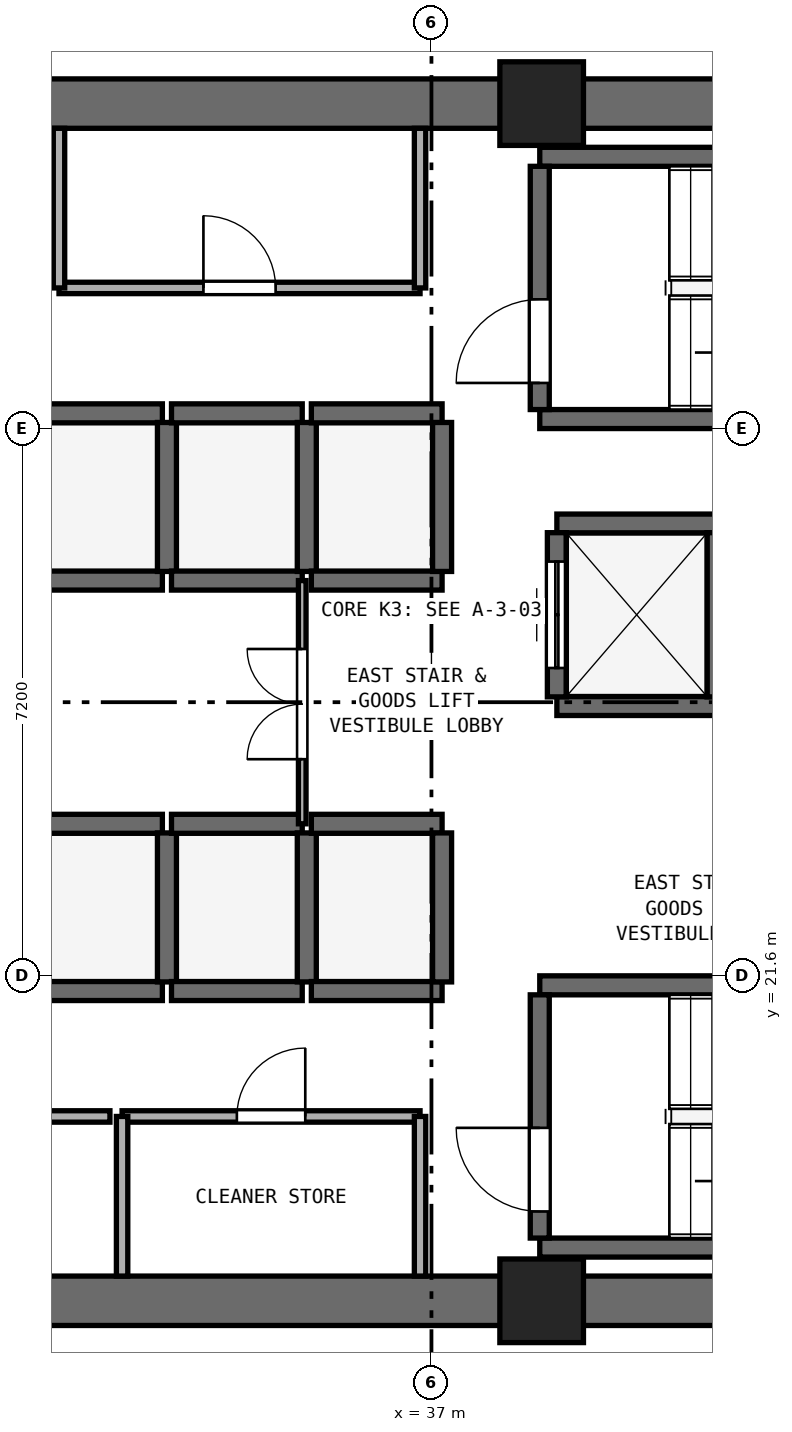
"""IFC4 building model, lengths in metres.
Left out: names, types, materials, properties, quantities, classifications, styles, units other than length and angle.
Written with IfcOpenShell. Run it as: python <this file> out.ifc"""

import sys

from ifc_helpers import new_model, si_unit, direction, frame, frame_2d, origin, origin_2d, place, context, subcontext, project, spatial, rectangle, extrude, element, fill, save


model = new_model("IFC4")
c1 = context("Model", 3, precision=1e-05, world=origin(), true_north=direction((0.0, 1.0)))
c2 = subcontext(c1, "Body", "Model", "MODEL_VIEW")
j1 = project(units=[si_unit("LENGTHUNIT", "METRE"), si_unit("PLANEANGLEUNIT", "RADIAN")], contexts=[c1])
p1 = place(None, origin())
s1 = spatial("IfcSite", under=j1, at=p1, CompositionType="ELEMENT")
p2 = place(p1, origin())
s2 = spatial("IfcBuilding", under=s1, at=p2, CompositionType="ELEMENT")
p3 = place(p2, frame((0.0, 0.0, 32.6)))
s3 = spatial("IfcBuildingStorey", under=s2, at=p3, CompositionType="ELEMENT", Elevation=32.6)
for number, where, z_axis, x_axis in (
    (1, (25.4, 17.325, 0.0), (0.0, 0.0, 1.0), (1.0, 0.0, 0.0)),
    (2, (25.4, 33.075, 0.0), (0.0, 0.0, 1.0), (1.0, 0.0, 0.0)),
):
    element("IfcWall", number, at=place(p3, frame(where, z_axis=z_axis, x_axis=x_axis)), inside=s3, PredefinedType="SHEAR", context=c2, shape_type="SweptSolid", body=[
        extrude(rectangle(XDim=23.2, YDim=0.65, at=frame_2d((11.6, 0.0))), origin(), (0.0, 0.0, 1.0), 3.525),
    ])
for number, where, z_axis, x_axis in (
    (3, (38.45, 17.325, 0.0), (0.0, 0.0, 1.0), (1.0, 0.0, 0.0)),
    (4, (38.45, 33.075, 0.0), (0.0, 0.0, 1.0), (1.0, 0.0, 0.0)),
):
    element("IfcColumn", number, at=place(p3, frame(where, z_axis=z_axis, x_axis=x_axis)), inside=s3, PredefinedType="PILASTER", context=c2, shape_type="SweptSolid", body=[
        extrude(rectangle(XDim=1.1, YDim=1.1, at=origin_2d()), origin(), (0.0, 0.0, 1.0), 3.8),
    ])
for number, where, z_axis, x_axis in (
    (5, (38.425, 28.925, 0.0), (0.0, 0.0, 1.0), (1.0, 0.0, 0.0)),
    (6, (38.425, 32.375, 0.0), (0.0, 0.0, 1.0), (1.0, 0.0, 0.0)),
):
    element("IfcWall", number, at=place(p3, frame(where, z_axis=z_axis, x_axis=x_axis)), inside=s3, PredefinedType="SHEAR", context=c2, shape_type="SweptSolid", body=[
        extrude(rectangle(XDim=7.3, YDim=0.25, at=frame_2d((3.65, 0.0))), origin(), (0.0, 0.0, 1.0), 3.525),
    ])
p4 = place(p3, frame((38.425, 29.05, 0.0), z_axis=(0.0, 0.0, 1.0), x_axis=(0.0, 1.0, 0.0)))
e7 = element("IfcWall", 7, at=p4, inside=s3, PredefinedType="SHEAR", context=c2, shape_type="SweptSolid", body=[
    extrude(rectangle(XDim=3.2, YDim=0.25, at=frame_2d((1.6, 0.0))), origin(), (0.0, 0.0, 1.0), 3.525),
])
p5 = place(p4, frame((0.35, 0.0, 0.0)))
e8 = element("IfcOpeningElement", 8, at=p5, cuts=e7, PredefinedType="OPENING", context=c2, shape_type="SweptSolid", body=[
    extrude(rectangle(XDim=1.1, YDim=2.15, at=frame_2d((0.55, 1.075))), frame((0.0, 0.135, 0.0), z_axis=(0.0, -1.0, 0.0), x_axis=(1.0, 0.0, 0.0)), (0.0, 0.0, 1.0), 0.27),
])
for number, where, z_axis, x_axis in (
    (9, (38.425, 18.025, 0.0), (0.0, 0.0, 1.0), (1.0, 0.0, 0.0)),
    (10, (38.425, 21.475, 0.0), (0.0, 0.0, 1.0), (1.0, 0.0, 0.0)),
):
    element("IfcWall", number, at=place(p3, frame(where, z_axis=z_axis, x_axis=x_axis)), inside=s3, PredefinedType="SHEAR", context=c2, shape_type="SweptSolid", body=[
        extrude(rectangle(XDim=7.3, YDim=0.25, at=frame_2d((3.65, 0.0))), origin(), (0.0, 0.0, 1.0), 3.525),
    ])
p6 = place(p3, frame((38.425, 18.15, 0.0), z_axis=(0.0, 0.0, 1.0), x_axis=(0.0, 1.0, 0.0)))
e11 = element("IfcWall", 11, at=p6, inside=s3, PredefinedType="SHEAR", context=c2, shape_type="SweptSolid", body=[
    extrude(rectangle(XDim=3.2, YDim=0.25, at=frame_2d((1.6, 0.0))), origin(), (0.0, 0.0, 1.0), 3.525),
])
p7 = place(p6, frame((0.35, 0.0, 0.0)))
e12 = element("IfcOpeningElement", 12, at=p7, cuts=e11, PredefinedType="OPENING", context=c2, shape_type="SweptSolid", body=[
    extrude(rectangle(XDim=1.1, YDim=2.15, at=frame_2d((0.55, 1.075))), frame((0.0, 0.135, 0.0), z_axis=(0.0, -1.0, 0.0), x_axis=(1.0, 0.0, 0.0)), (0.0, 0.0, 1.0), 0.27),
])
for number, where, z_axis, x_axis in (
    (13, (31.74, 21.4, 0.0), (0.0, 0.0, 1.0), (1.0, 0.0, 0.0)),
    (14, (31.74, 23.6, 0.0), (0.0, 0.0, 1.0), (1.0, 0.0, 0.0)),
):
    element("IfcWall", number, at=place(p3, frame(where, z_axis=z_axis, x_axis=x_axis)), inside=s3, PredefinedType="SHEAR", context=c2, shape_type="SweptSolid", body=[
        extrude(rectangle(XDim=1.72, YDim=0.25, at=frame_2d((0.86, 0.0))), origin(), (0.0, 0.0, 1.0), 3.525),
    ])
p8 = place(p3, frame((33.52, 21.52, 0.0), z_axis=(0.0, 0.0, 1.0), x_axis=(0.0, 1.0, 0.0)))
e15 = element("IfcWall", 15, at=p8, inside=s3, PredefinedType="SHEAR", context=c2, shape_type="SweptSolid", body=[
    extrude(rectangle(XDim=1.96, YDim=0.25, at=frame_2d((0.98, 0.0))), origin(), (0.0, 0.0, 1.0), 3.525),
])
for number, where, z_axis, x_axis in (
    (16, (33.58, 21.4, 0.0), (0.0, 0.0, 1.0), (1.0, 0.0, 0.0)),
    (17, (33.58, 23.6, 0.0), (0.0, 0.0, 1.0), (1.0, 0.0, 0.0)),
):
    element("IfcWall", number, at=place(p3, frame(where, z_axis=z_axis, x_axis=x_axis)), inside=s3, PredefinedType="SHEAR", context=c2, shape_type="SweptSolid", body=[
        extrude(rectangle(XDim=1.72, YDim=0.25, at=frame_2d((0.86, 0.0))), origin(), (0.0, 0.0, 1.0), 3.525),
    ])
p9 = place(p3, frame((35.36, 21.52, 0.0), z_axis=(0.0, 0.0, 1.0), x_axis=(0.0, 1.0, 0.0)))
e18 = element("IfcWall", 18, at=p9, inside=s3, PredefinedType="SHEAR", context=c2, shape_type="SweptSolid", body=[
    extrude(rectangle(XDim=1.96, YDim=0.25, at=frame_2d((0.98, 0.0))), origin(), (0.0, 0.0, 1.0), 3.525),
])
for number, where, z_axis, x_axis in (
    (19, (35.42, 21.4, 0.0), (0.0, 0.0, 1.0), (1.0, 0.0, 0.0)),
    (20, (35.42, 23.6, 0.0), (0.0, 0.0, 1.0), (1.0, 0.0, 0.0)),
):
    element("IfcWall", number, at=place(p3, frame(where, z_axis=z_axis, x_axis=x_axis)), inside=s3, PredefinedType="SHEAR", context=c2, shape_type="SweptSolid", body=[
        extrude(rectangle(XDim=1.72, YDim=0.25, at=frame_2d((0.86, 0.0))), origin(), (0.0, 0.0, 1.0), 3.525),
    ])
p10 = place(p3, frame((37.14, 21.52, 0.0), z_axis=(0.0, 0.0, 1.0), x_axis=(0.0, 1.0, 0.0)))
e21 = element("IfcWall", 21, at=p10, inside=s3, PredefinedType="SHEAR", context=c2, shape_type="SweptSolid", body=[
    extrude(rectangle(XDim=1.96, YDim=0.25, at=frame_2d((0.98, 0.0))), origin(), (0.0, 0.0, 1.0), 3.525),
])
for number, where, z_axis, x_axis in (
    (22, (31.74, 26.8, 0.0), (0.0, 0.0, 1.0), (1.0, 0.0, 0.0)),
    (23, (31.74, 29.0, 0.0), (0.0, 0.0, 1.0), (1.0, 0.0, 0.0)),
):
    element("IfcWall", number, at=place(p3, frame(where, z_axis=z_axis, x_axis=x_axis)), inside=s3, PredefinedType="SHEAR", context=c2, shape_type="SweptSolid", body=[
        extrude(rectangle(XDim=1.72, YDim=0.25, at=frame_2d((0.86, 0.0))), origin(), (0.0, 0.0, 1.0), 3.525),
    ])
p11 = place(p3, frame((33.52, 26.92, 0.0), z_axis=(0.0, 0.0, 1.0), x_axis=(0.0, 1.0, 0.0)))
e24 = element("IfcWall", 24, at=p11, inside=s3, PredefinedType="SHEAR", context=c2, shape_type="SweptSolid", body=[
    extrude(rectangle(XDim=1.96, YDim=0.25, at=frame_2d((0.98, 0.0))), origin(), (0.0, 0.0, 1.0), 3.525),
])
for number, where, z_axis, x_axis in (
    (25, (33.58, 26.8, 0.0), (0.0, 0.0, 1.0), (1.0, 0.0, 0.0)),
    (26, (33.58, 29.0, 0.0), (0.0, 0.0, 1.0), (1.0, 0.0, 0.0)),
):
    element("IfcWall", number, at=place(p3, frame(where, z_axis=z_axis, x_axis=x_axis)), inside=s3, PredefinedType="SHEAR", context=c2, shape_type="SweptSolid", body=[
        extrude(rectangle(XDim=1.72, YDim=0.25, at=frame_2d((0.86, 0.0))), origin(), (0.0, 0.0, 1.0), 3.525),
    ])
p12 = place(p3, frame((35.36, 26.92, 0.0), z_axis=(0.0, 0.0, 1.0), x_axis=(0.0, 1.0, 0.0)))
e27 = element("IfcWall", 27, at=p12, inside=s3, PredefinedType="SHEAR", context=c2, shape_type="SweptSolid", body=[
    extrude(rectangle(XDim=1.96, YDim=0.25, at=frame_2d((0.98, 0.0))), origin(), (0.0, 0.0, 1.0), 3.525),
])
for number, where, z_axis, x_axis in (
    (28, (35.42, 26.8, 0.0), (0.0, 0.0, 1.0), (1.0, 0.0, 0.0)),
    (29, (35.42, 29.0, 0.0), (0.0, 0.0, 1.0), (1.0, 0.0, 0.0)),
):
    element("IfcWall", number, at=place(p3, frame(where, z_axis=z_axis, x_axis=x_axis)), inside=s3, PredefinedType="SHEAR", context=c2, shape_type="SweptSolid", body=[
        extrude(rectangle(XDim=1.72, YDim=0.25, at=frame_2d((0.86, 0.0))), origin(), (0.0, 0.0, 1.0), 3.525),
    ])
p13 = place(p3, frame((37.14, 26.92, 0.0), z_axis=(0.0, 0.0, 1.0), x_axis=(0.0, 1.0, 0.0)))
e30 = element("IfcWall", 30, at=p13, inside=s3, PredefinedType="SHEAR", context=c2, shape_type="SweptSolid", body=[
    extrude(rectangle(XDim=1.96, YDim=0.25, at=frame_2d((0.98, 0.0))), origin(), (0.0, 0.0, 1.0), 3.525),
])
for number, where, z_axis, x_axis in (
    (31, (38.65, 25.15, 0.0), (0.0, 0.0, 1.0), (1.0, 0.0, 0.0)),
    (32, (38.65, 27.55, 0.0), (0.0, 0.0, 1.0), (1.0, 0.0, 0.0)),
):
    element("IfcWall", number, at=place(p3, frame(where, z_axis=z_axis, x_axis=x_axis)), inside=s3, PredefinedType="SHEAR", context=c2, shape_type="SweptSolid", body=[
        extrude(rectangle(XDim=2.1, YDim=0.25, at=frame_2d((1.05, 0.0))), origin(), (0.0, 0.0, 1.0), 3.525),
    ])
p14 = place(p3, frame((38.65, 25.27, 0.0), z_axis=(0.0, 0.0, 1.0), x_axis=(0.0, 1.0, 0.0)))
e33 = element("IfcWall", 33, at=p14, inside=s3, PredefinedType="SHEAR", context=c2, shape_type="SweptSolid", body=[
    extrude(rectangle(XDim=2.16, YDim=0.25, at=frame_2d((1.08, 0.0))), origin(), (0.0, 0.0, 1.0), 3.525),
])
p15 = place(p14, frame((0.38, 0.0, 0.0)))
e34 = element("IfcOpeningElement", 34, at=p15, cuts=e33, PredefinedType="OPENING", context=c2, shape_type="SweptSolid", body=[
    extrude(rectangle(XDim=1.4, YDim=2.2, at=frame_2d((0.7, 1.1))), frame((0.0, 0.135, 0.0), z_axis=(0.0, -1.0, 0.0), x_axis=(1.0, 0.0, 0.0)), (0.0, 0.0, 1.0), 0.27),
])
p16 = place(p3, frame((40.75, 25.27, 0.0), z_axis=(0.0, 0.0, 1.0), x_axis=(0.0, 1.0, 0.0)))
e35 = element("IfcWall", 35, at=p16, inside=s3, PredefinedType="SHEAR", context=c2, shape_type="SweptSolid", body=[
    extrude(rectangle(XDim=2.16, YDim=0.25, at=frame_2d((1.08, 0.0))), origin(), (0.0, 0.0, 1.0), 3.525),
])
p17 = place(p3, frame((32.1, 30.65, 0.0), z_axis=(0.0, 0.0, 1.0), x_axis=(1.0, 0.0, 0.0)))
e36 = element("IfcWall", 36, at=p17, inside=s3, PredefinedType="PARTITIONING", context=c2, shape_type="SweptSolid", body=[
    extrude(rectangle(XDim=4.75, YDim=0.15, at=frame_2d((2.375, 0.0))), origin(), (0.0, 0.0, 1.0), 3.525),
])
p18 = place(p17, frame((1.9, 0.0, 0.0)))
e37 = element("IfcOpeningElement", 37, at=p18, cuts=e36, PredefinedType="OPENING", context=c2, shape_type="SweptSolid", body=[
    extrude(rectangle(XDim=0.95, YDim=2.1, at=frame_2d((0.475, 1.05))), frame((0.0, 0.085, 0.0), z_axis=(0.0, -1.0, 0.0), x_axis=(1.0, 0.0, 0.0)), (0.0, 0.0, 1.0), 0.17),
])
for number, where, z_axis, x_axis in (
    (38, (32.1, 30.65, 0.0), (0.0, 0.0, 1.0), (0.0, 1.0, 0.0)),
    (39, (36.85, 30.65, 0.0), (0.0, 0.0, 1.0), (0.0, 1.0, 0.0)),
):
    element("IfcWall", number, at=place(p3, frame(where, z_axis=z_axis, x_axis=x_axis)), inside=s3, PredefinedType="PARTITIONING", context=c2, shape_type="SweptSolid", body=[
        extrude(rectangle(XDim=2.1, YDim=0.15, at=frame_2d((1.05, 0.0))), origin(), (0.0, 0.0, 1.0), 3.525),
    ])
p19 = place(p3, frame((29.53, 19.75, 0.0), z_axis=(0.0, 0.0, 1.0), x_axis=(1.0, 0.0, 0.0)))
e40 = element("IfcWall", 40, at=p19, inside=s3, PredefinedType="PARTITIONING", context=c2, shape_type="SweptSolid", body=[
    extrude(rectangle(XDim=3.24, YDim=0.15, at=frame_2d((1.62, 0.0))), origin(), (0.0, 0.0, 1.0), 3.525),
])
p20 = place(p19, frame((1.145, 0.0, 0.0)))
e41 = element("IfcOpeningElement", 41, at=p20, cuts=e40, PredefinedType="OPENING", context=c2, shape_type="SweptSolid", body=[
    extrude(rectangle(XDim=0.95, YDim=2.1, at=frame_2d((0.475, 1.05))), frame((0.0, 0.085, 0.0), z_axis=(0.0, -1.0, 0.0), x_axis=(1.0, 0.0, 0.0)), (0.0, 0.0, 1.0), 0.17),
])
p21 = place(p3, frame((32.93, 19.75, 0.0), z_axis=(0.0, 0.0, 1.0), x_axis=(1.0, 0.0, 0.0)))
e42 = element("IfcWall", 42, at=p21, inside=s3, PredefinedType="PARTITIONING", context=c2, shape_type="SweptSolid", body=[
    extrude(rectangle(XDim=3.92, YDim=0.15, at=frame_2d((1.96, 0.0))), origin(), (0.0, 0.0, 1.0), 3.525),
])
p22 = place(p21, frame((1.51, 0.0, 0.0)))
e43 = element("IfcOpeningElement", 43, at=p22, cuts=e42, PredefinedType="OPENING", context=c2, shape_type="SweptSolid", body=[
    extrude(rectangle(XDim=0.9, YDim=2.1, at=frame_2d((0.45, 1.05))), frame((0.0, 0.085, 0.0), z_axis=(0.0, -1.0, 0.0), x_axis=(1.0, 0.0, 0.0)), (0.0, 0.0, 1.0), 0.17),
])
for number, where, z_axis, x_axis in (
    (44, (32.93, 17.65, 0.0), (0.0, 0.0, 1.0), (0.0, 1.0, 0.0)),
    (45, (36.85, 17.65, 0.0), (0.0, 0.0, 1.0), (0.0, 1.0, 0.0)),
):
    element("IfcWall", number, at=place(p3, frame(where, z_axis=z_axis, x_axis=x_axis)), inside=s3, PredefinedType="PARTITIONING", context=c2, shape_type="SweptSolid", body=[
        extrude(rectangle(XDim=2.1, YDim=0.15, at=frame_2d((1.05, 0.0))), origin(), (0.0, 0.0, 1.0), 3.525),
    ])
p23 = place(p3, frame((35.3, 23.6, 0.0), z_axis=(0.0, 0.0, 1.0), x_axis=(0.0, 1.0, 0.0)))
e46 = element("IfcWall", 46, at=p23, inside=s3, PredefinedType="PARTITIONING", context=c2, shape_type="SweptSolid", body=[
    extrude(rectangle(XDim=3.2, YDim=0.1, at=frame_2d((1.6, 0.0))), origin(), (0.0, 0.0, 1.0), 3.525),
])
p24 = place(p23, frame((0.85, 0.0, 0.0)))
e47 = element("IfcOpeningElement", 47, at=p24, cuts=e46, PredefinedType="OPENING", context=c2, shape_type="SweptSolid", body=[
    extrude(rectangle(XDim=1.45, YDim=2.12, at=frame_2d((0.725, 1.06))), frame((0.0, 0.06, 0.0), z_axis=(0.0, -1.0, 0.0), x_axis=(1.0, 0.0, 0.0)), (0.0, 0.0, 1.0), 0.12),
])
p25 = place(p5, origin())
e48 = element("IfcDoor", 48, at=p25, inside=s3, OperationType="SINGLE_SWING_LEFT", PredefinedType="DOOR", context=c2, shape_type="SweptSolid", body=[
    extrude(rectangle(XDim=1.1, YDim=2.15, at=frame_2d((0.55, 1.075))), frame((0.0, 0.025, 0.0), z_axis=(0.0, -1.0, 0.0), x_axis=(1.0, 0.0, 0.0)), (0.0, 0.0, 1.0), 0.05),
])
fill(e8, e48)
p26 = place(p7, origin())
e49 = element("IfcDoor", 49, at=p26, inside=s3, OperationType="SINGLE_SWING_RIGHT", PredefinedType="DOOR", context=c2, shape_type="SweptSolid", body=[
    extrude(rectangle(XDim=1.1, YDim=2.15, at=frame_2d((0.55, 1.075))), frame((0.0, 0.025, 0.0), z_axis=(0.0, -1.0, 0.0), x_axis=(1.0, 0.0, 0.0)), (0.0, 0.0, 1.0), 0.05),
])
fill(e12, e49)
p27 = place(p15, origin())
e50 = element("IfcDoor", 50, at=p27, inside=s3, OperationType="DOUBLE_DOOR_SLIDING", PredefinedType="DOOR", context=c2, shape_type="SweptSolid", body=[
    extrude(rectangle(XDim=1.4, YDim=2.2, at=frame_2d((0.7, 1.1))), frame((0.0, 0.025, 0.0), z_axis=(0.0, -1.0, 0.0), x_axis=(1.0, 0.0, 0.0)), (0.0, 0.0, 1.0), 0.05),
])
fill(e34, e50)
p28 = place(p18, origin())
e51 = element("IfcDoor", 51, at=p28, inside=s3, OperationType="SINGLE_SWING_LEFT", PredefinedType="DOOR", context=c2, shape_type="SweptSolid", body=[
    extrude(rectangle(XDim=0.95, YDim=2.1, at=frame_2d((0.475, 1.05))), frame((0.0, 0.025, 0.0), z_axis=(0.0, -1.0, 0.0), x_axis=(1.0, 0.0, 0.0)), (0.0, 0.0, 1.0), 0.05),
])
fill(e37, e51)
p29 = place(p22, origin())
e52 = element("IfcDoor", 52, at=p29, inside=s3, OperationType="SINGLE_SWING_RIGHT", PredefinedType="DOOR", context=c2, shape_type="SweptSolid", body=[
    extrude(rectangle(XDim=0.9, YDim=2.1, at=frame_2d((0.45, 1.05))), frame((0.0, 0.025, 0.0), z_axis=(0.0, -1.0, 0.0), x_axis=(1.0, 0.0, 0.0)), (0.0, 0.0, 1.0), 0.05),
])
fill(e43, e52)
p30 = place(p24, origin())
e53 = element("IfcDoor", 53, at=p30, inside=s3, OperationType="DOUBLE_DOOR_SINGLE_SWING", PredefinedType="DOOR", context=c2, shape_type="SweptSolid", body=[
    extrude(rectangle(XDim=1.45, YDim=2.12, at=frame_2d((0.725, 1.06))), frame((0.0, 0.025, 0.0), z_axis=(0.0, -1.0, 0.0), x_axis=(1.0, 0.0, 0.0)), (0.0, 0.0, 1.0), 0.05),
])
fill(e47, e53)
save(model, sys.argv[1])
